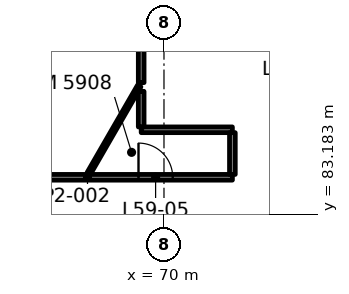
"""IFC4 building model, lengths in metres.
Left out: names, types, materials, properties, quantities, classifications, styles, units other than length and angle.
Written with IfcOpenShell. Run it as: python <this file> out.ifc"""

import sys

from ifc_helpers import new_model, si_unit, direction, frame, frame_2d, origin, place, context, subcontext, project, spatial, rectangle, extrude, element, fill, save


model = new_model("IFC4")
c1 = context("Model", 3, precision=1e-05, world=origin(), true_north=direction((0.0, 1.0)))
c2 = subcontext(c1, "Body", "Model", "MODEL_VIEW")
j1 = project(units=[si_unit("LENGTHUNIT", "METRE"), si_unit("PLANEANGLEUNIT", "RADIAN")], contexts=[c1])
p1 = place(None, origin())
s1 = spatial("IfcSite", under=j1, at=p1, CompositionType="ELEMENT")
p2 = place(p1, origin())
s2 = spatial("IfcBuilding", under=s1, at=p2, CompositionType="ELEMENT")
p3 = place(p2, frame((0.0, 0.0, 252.1)))
s3 = spatial("IfcBuildingStorey", under=s2, at=p3, CompositionType="ELEMENT", Elevation=252.1)
p4 = place(p3, frame((64.175, 84.15, 0.0), z_axis=(0.0, 0.0, 1.0), x_axis=(1.0, 0.0, 0.0)))
e1 = element("IfcWall", 1, at=p4, inside=s3, PredefinedType="PARTITIONING", context=c2, shape_type="SweptSolid", body=[
    extrude(rectangle(XDim=7.625, YDim=0.15, at=frame_2d((3.812, 0.0))), origin(), (0.0, 0.0, 1.0), 3.7),
])
p5 = place(p4, frame((0.8, 0.0, 0.0)))
e2 = element("IfcOpeningElement", 2, at=p5, cuts=e1, PredefinedType="OPENING", context=c2, shape_type="SweptSolid", body=[
    extrude(rectangle(XDim=1.2, YDim=2.1, at=frame_2d((0.6, 1.05))), frame((0.0, 0.085, 0.0), z_axis=(0.0, -1.0, 0.0), x_axis=(1.0, 0.0, 0.0)), (0.0, 0.0, 1.0), 0.17),
])
p6 = place(p4, frame((5.155, 0.0, 0.0)))
e3 = element("IfcOpeningElement", 3, at=p6, cuts=e1, PredefinedType="OPENING", context=c2, shape_type="SweptSolid", body=[
    extrude(rectangle(XDim=0.9, YDim=2.1, at=frame_2d((0.45, 1.05))), frame((0.0, 0.085, 0.0), z_axis=(0.0, -1.0, 0.0), x_axis=(1.0, 0.0, 0.0)), (0.0, 0.0, 1.0), 0.17),
])
p7 = place(p3, frame((69.4, 85.4, 0.0), z_axis=(0.0, 0.0, 1.0), x_axis=(1.0, 0.0, 0.0)))
e4 = element("IfcWall", 4, at=p7, inside=s3, PredefinedType="PARTITIONING", context=c2, shape_type="SweptSolid", body=[
    extrude(rectangle(XDim=2.399, YDim=0.15, at=frame_2d((1.2, 0.0))), origin(), (0.0, 0.0, 1.0), 3.7),
])
p8 = place(p3, frame((68.021, 84.251, 0.0), z_axis=(0.0, 0.0, 1.0), x_axis=(0.500000661934, 0.866025021616, 0.0)))
e5 = element("IfcWall", 5, at=p8, inside=s3, PredefinedType="PARTITIONING", context=c2, shape_type="SweptSolid", body=[
    extrude(rectangle(XDim=2.659, YDim=0.1, at=frame_2d((1.329, 0.0))), origin(), (0.0, 0.0, 1.0), 3.7),
])
p9 = place(p3, frame((71.8, 84.225, 0.0), z_axis=(0.0, 0.0, 1.0), x_axis=(0.0, 1.0, 0.0)))
e6 = element("IfcWall", 6, at=p9, inside=s3, PredefinedType="PARTITIONING", context=c2, shape_type="SweptSolid", body=[
    extrude(rectangle(XDim=1.099, YDim=0.15, at=frame_2d((0.55, 0.0))), origin(), (0.0, 0.0, 1.0), 3.7),
])
p10 = place(p3, frame((69.4, 85.476, 0.0), z_axis=(0.0, 0.0, 1.0), x_axis=(0.0, 1.0, 0.0)))
e7 = element("IfcWall", 7, at=p10, inside=s3, PredefinedType="PARTITIONING", context=c2, shape_type="SweptSolid", body=[
    extrude(rectangle(XDim=0.936, YDim=0.15, at=frame_2d((0.468, 0.0))), origin(), (0.0, 0.0, 1.0), 3.7),
])
p11 = place(p3, frame((69.4, 86.641, 0.0), z_axis=(0.0, 0.0, 1.0), x_axis=(0.0, 1.0, 0.0)))
e8 = element("IfcWall", 8, at=p11, inside=s3, PredefinedType="PARTITIONING", context=c2, shape_type="SweptSolid", body=[
    extrude(rectangle(XDim=10.359, YDim=0.15, at=frame_2d((5.18, 0.0))), origin(), (0.0, 0.0, 1.0), 3.7),
])
p12 = place(p6, origin())
e9 = element("IfcDoor", 9, at=p12, inside=s3, OperationType="SINGLE_SWING_LEFT", PredefinedType="DOOR", context=c2, shape_type="SweptSolid", body=[
    extrude(rectangle(XDim=0.9, YDim=2.1, at=frame_2d((0.45, 1.05))), frame((0.0, 0.025, 0.0), z_axis=(0.0, -1.0, 0.0), x_axis=(1.0, 0.0, 0.0)), (0.0, 0.0, 1.0), 0.05),
])
fill(e3, e9)
save(model, sys.argv[1])
